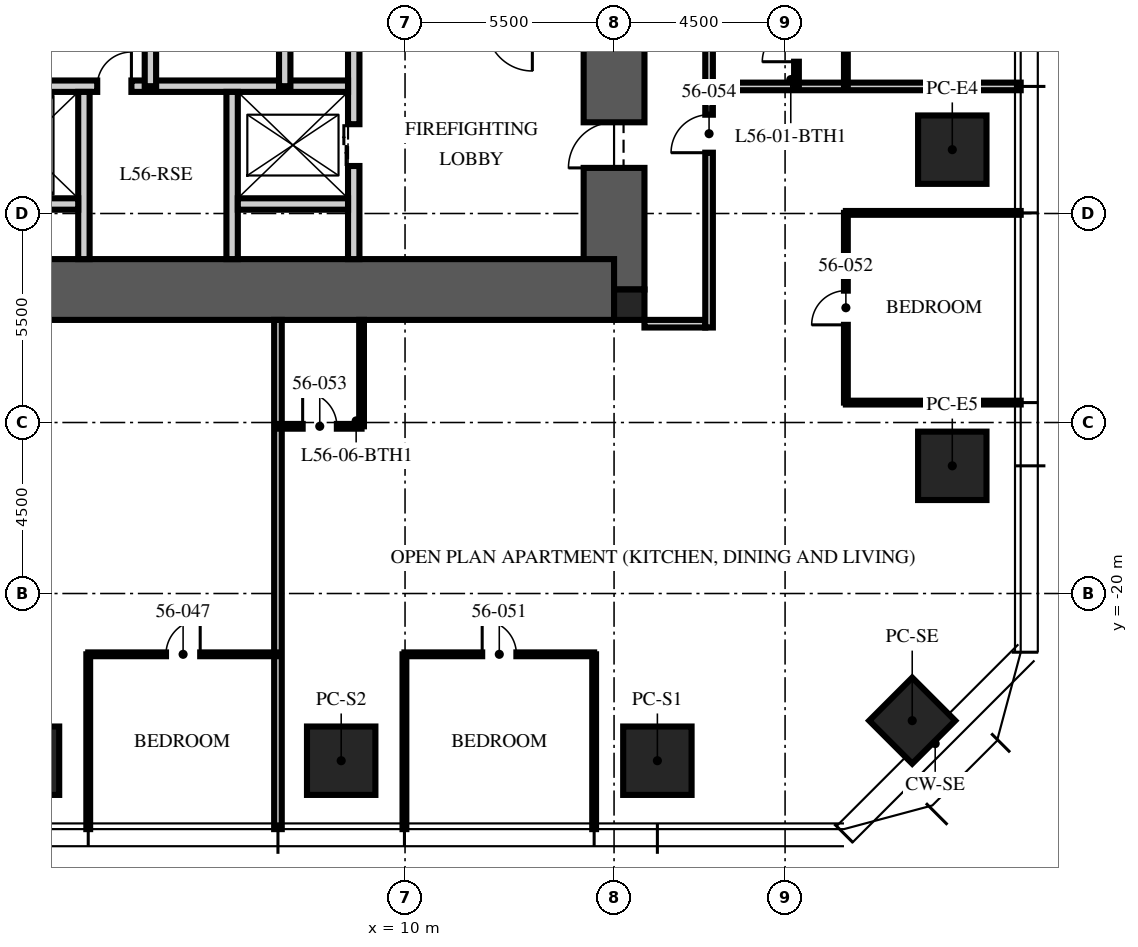
"""IFC4 building model, lengths in metres.
Left out: names, types, materials, properties, quantities, classifications, styles, units other than length and angle.
Written with IfcOpenShell. Run it as: python <this file> out.ifc"""

import sys

from ifc_helpers import new_model, si_unit, direction, frame, frame_2d, origin, origin_2d, place, context, subcontext, project, spatial, rectangle, extrude, element, fill, save


model = new_model("IFC4")
c1 = context("Model", 3, precision=1e-05, world=origin(), true_north=direction((0.0, 1.0)))
c2 = subcontext(c1, "Body", "Model", "MODEL_VIEW")
j1 = project(units=[si_unit("LENGTHUNIT", "METRE"), si_unit("PLANEANGLEUNIT", "RADIAN")], contexts=[c1])
p1 = place(None, origin())
s1 = spatial("IfcSite", under=j1, at=p1, CompositionType="ELEMENT")
p2 = place(p1, origin())
s2 = spatial("IfcBuilding", under=s1, at=p2, CompositionType="ELEMENT")
p3 = place(p2, frame((0.0, 0.0, 225.75)))
s3 = spatial("IfcBuildingStorey", under=s2, at=p3, CompositionType="ELEMENT", Elevation=225.75)
p4 = place(p3, frame((15.5, -12.0, -0.25), z_axis=(0.0, 0.0, 1.0), x_axis=(0.0, 1.0, 0.0)))
e1 = element("IfcWall", 1, at=p4, inside=s3, PredefinedType="SHEAR", context=c2, shape_type="SweptSolid", body=[
    extrude(rectangle(XDim=24.0, YDim=1.6, at=frame_2d((12.0, 0.0))), origin(), (0.0, 0.0, 1.0), 3.75),
])
p5 = place(p4, frame((3.2, 0.0, 0.25)))
e2 = element("IfcOpeningElement", 2, at=p5, cuts=e1, PredefinedType="OPENING", context=c2, shape_type="SweptSolid", body=[
    extrude(rectangle(XDim=1.2, YDim=2.1, at=frame_2d((0.6, 1.05))), frame((0.0, 0.81, 0.0), z_axis=(0.0, -1.0, 0.0), x_axis=(1.0, 0.0, 0.0)), (0.0, 0.0, 1.0), 1.62),
])
p6 = place(p4, frame((19.3, 0.0, 0.25)))
e3 = element("IfcOpeningElement", 3, at=p6, cuts=e1, PredefinedType="OPENING", context=c2, shape_type="SweptSolid", body=[
    extrude(rectangle(XDim=1.8, YDim=2.1, at=frame_2d((0.9, 1.05))), frame((0.0, 0.81, 0.0), z_axis=(0.0, -1.0, 0.0), x_axis=(1.0, 0.0, 0.0)), (0.0, 0.0, 1.0), 1.62),
])
p7 = place(p3, frame((-15.5, -12.0, -0.25), z_axis=(0.0, 0.0, 1.0), x_axis=(1.0, 0.0, 0.0)))
e4 = element("IfcWall", 4, at=p7, inside=s3, PredefinedType="SHEAR", context=c2, shape_type="SweptSolid", body=[
    extrude(rectangle(XDim=31.0, YDim=1.6, at=frame_2d((15.5, 0.0))), origin(), (0.0, 0.0, 1.0), 3.75),
])
p8 = place(p3, frame((15.9, -12.4, -0.25), z_axis=(0.0, 0.0, 1.0), x_axis=(1.0, 0.0, 0.0)))
e5 = element("IfcColumn", 5, at=p8, inside=s3, PredefinedType="COLUMN", context=c2, shape_type="SweptSolid", body=[
    extrude(rectangle(XDim=0.8, YDim=0.8, at=origin_2d()), origin(), (0.0, 0.0, 1.0), 3.75),
])
for number, where, z_axis, x_axis in (
    (6, (24.4, -8.32, 0.0), (0.0, 0.0, 1.0), (0.0, 1.0, 0.0)),
    (7, (24.4, -16.64, 0.0), (0.0, 0.0, 1.0), (0.0, 1.0, 0.0)),
    (8, (16.64, -24.4, 0.0), (0.0, 0.0, 1.0), (1.0, 0.0, 0.0)),
    (9, (8.32, -24.4, 0.0), (0.0, 0.0, 1.0), (1.0, 0.0, 0.0)),
    (10, (0.0, -24.4, 0.0), (0.0, 0.0, 1.0), (1.0, 0.0, 0.0)),
):
    element("IfcColumn", number, at=place(p3, frame(where, z_axis=z_axis, x_axis=x_axis)), inside=s3, PredefinedType="COLUMN", context=c2, shape_type="SweptSolid", body=[
        extrude(rectangle(XDim=1.8, YDim=1.8, at=origin_2d()), origin(), (0.0, 0.0, 1.0), 3.75),
    ])
p9 = place(p3, frame((23.346, -23.346, 0.0), z_axis=(0.0, 0.0, 1.0), x_axis=(0.707106781187, 0.707106781187, 0.0)))
e11 = element("IfcColumn", 11, at=p9, inside=s3, PredefinedType="COLUMN", context=c2, shape_type="SweptSolid", body=[
    extrude(rectangle(XDim=1.6, YDim=1.6, at=origin_2d()), origin(), (0.0, 0.0, 1.0), 3.75),
])
p10 = place(p3, frame((8.65, -11.2, 0.0), z_axis=(0.0, 0.0, 1.0), x_axis=(0.0, 1.0, 0.0)))
e12 = element("IfcWall", 12, at=p10, inside=s3, PredefinedType="PARTITIONING", context=c2, shape_type="SweptSolid", body=[
    extrude(rectangle(XDim=6.3, YDim=0.3, at=frame_2d((3.15, 0.0))), origin(), (0.0, 0.0, 1.0), 3.5),
])
p11 = place(p10, frame((2.45, 0.0, 0.0)))
e13 = element("IfcOpeningElement", 13, at=p11, cuts=e12, PredefinedType="OPENING", context=c2, shape_type="SweptSolid", body=[
    extrude(rectangle(XDim=1.1, YDim=2.1, at=frame_2d((0.55, 1.05))), frame((0.0, 0.16, 0.0), z_axis=(0.0, -1.0, 0.0), x_axis=(1.0, 0.0, 0.0)), (0.0, 0.0, 1.0), 0.32),
])
p12 = place(p3, frame((-8.5, -6.65, 0.0), z_axis=(0.0, 0.0, 1.0), x_axis=(1.0, 0.0, 0.0)))
e14 = element("IfcWall", 14, at=p12, inside=s3, PredefinedType="PARTITIONING", context=c2, shape_type="SweptSolid", body=[
    extrude(rectangle(XDim=17.0, YDim=0.3, at=frame_2d((8.5, 0.0))), origin(), (0.0, 0.0, 1.0), 3.5),
])
p13 = place(p12, frame((7.8, 0.0, 0.0)))
e15 = element("IfcOpeningElement", 15, at=p13, cuts=e14, PredefinedType="OPENING", context=c2, shape_type="SweptSolid", body=[
    extrude(rectangle(XDim=1.3, YDim=2.4, at=frame_2d((0.65, 1.2))), frame((0.0, 0.16, 0.0), z_axis=(0.0, -1.0, 0.0), x_axis=(1.0, 0.0, 0.0)), (0.0, 0.0, 1.0), 0.32),
])
p14 = place(p12, frame((5.65, 0.0, 0.0)))
e16 = element("IfcOpeningElement", 16, at=p14, cuts=e14, PredefinedType="OPENING", context=c2, shape_type="SweptSolid", body=[
    extrude(rectangle(XDim=0.9, YDim=2.1, at=frame_2d((0.45, 1.05))), frame((0.0, 0.16, 0.0), z_axis=(0.0, -1.0, 0.0), x_axis=(1.0, 0.0, 0.0)), (0.0, 0.0, 1.0), 0.32),
])
p15 = place(p12, frame((10.4, 0.0, 0.0)))
e17 = element("IfcOpeningElement", 17, at=p15, cuts=e14, PredefinedType="OPENING", context=c2, shape_type="SweptSolid", body=[
    extrude(rectangle(XDim=0.9, YDim=2.1, at=frame_2d((0.45, 1.05))), frame((0.0, 0.16, 0.0), z_axis=(0.0, -1.0, 0.0), x_axis=(1.0, 0.0, 0.0)), (0.0, 0.0, 1.0), 0.32),
])
for number, where, z_axis, x_axis in (
    (18, (1.55, -11.2, 0.0), (0.0, 0.0, 1.0), (0.0, 1.0, 0.0)),
    (19, (5.45, -11.2, 0.0), (0.0, 0.0, 1.0), (0.0, 1.0, 0.0)),
):
    element("IfcWall", number, at=place(p3, frame(where, z_axis=z_axis, x_axis=x_axis)), inside=s3, PredefinedType="PARTITIONING", context=c2, shape_type="SweptSolid", body=[
        extrude(rectangle(XDim=4.4, YDim=0.3, at=frame_2d((2.2, 0.0))), origin(), (0.0, 0.0, 1.0), 3.5),
    ])
for number, where, z_axis, x_axis in (
    (20, (-1.5, -9.75, 0.0), (0.0, 0.0, 1.0), (1.0, 0.0, 0.0)),
    (21, (5.6, -9.75, 0.0), (0.0, 0.0, 1.0), (1.0, 0.0, 0.0)),
):
    element("IfcWall", number, at=place(p3, frame(where, z_axis=z_axis, x_axis=x_axis)), inside=s3, PredefinedType="PARTITIONING", context=c2, shape_type="SweptSolid", body=[
        extrude(rectangle(XDim=2.9, YDim=0.3, at=frame_2d((1.45, 0.0))), origin(), (0.0, 0.0, 1.0), 3.5),
    ])
p16 = place(p3, frame((3.3, -6.65, 0.0), z_axis=(0.0, 0.0, 1.0), x_axis=(0.0, 1.0, 0.0)))
e22 = element("IfcWall", 22, at=p16, inside=s3, PredefinedType="PARTITIONING", context=c2, shape_type="SweptSolid", body=[
    extrude(rectangle(XDim=8.65, YDim=0.3, at=frame_2d((4.325, 0.0))), origin(), (0.0, 0.0, 1.0), 3.5),
])
p17 = place(p16, frame((3.875, 0.0, 0.0)))
e23 = element("IfcOpeningElement", 23, at=p17, cuts=e22, PredefinedType="OPENING", context=c2, shape_type="SweptSolid", body=[
    extrude(rectangle(XDim=0.9, YDim=2.1, at=frame_2d((0.45, 1.05))), frame((0.0, 0.16, 0.0), z_axis=(0.0, -1.0, 0.0), x_axis=(1.0, 0.0, 0.0)), (0.0, 0.0, 1.0), 0.32),
])
p18 = place(p3, frame((6.834, -6.65, 0.0), z_axis=(0.0, 0.0, 1.0), x_axis=(0.0, 1.0, 0.0)))
e24 = element("IfcWall", 24, at=p18, inside=s3, PredefinedType="PARTITIONING", context=c2, shape_type="SweptSolid", body=[
    extrude(rectangle(XDim=8.65, YDim=0.3, at=frame_2d((4.325, 0.0))), origin(), (0.0, 0.0, 1.0), 3.5),
])
p19 = place(p3, frame((16.3, -12.9, 0.0), z_axis=(0.0, 0.0, 1.0), x_axis=(1.0, 0.0, 0.0)))
e25 = element("IfcWall", 25, at=p19, inside=s3, PredefinedType="PARTITIONING", context=c2, shape_type="SweptSolid", body=[
    extrude(rectangle(XDim=1.6, YDim=0.2, at=frame_2d((0.8, 0.0))), origin(), (0.0, 0.0, 1.0), 2.3),
])
p20 = place(p3, frame((18.1, -6.656, 0.0), z_axis=(0.0, 0.0, 1.0), x_axis=(1.0, 0.0, 0.0)))
e26 = element("IfcWall", 26, at=p20, inside=s3, PredefinedType="PARTITIONING", context=c2, shape_type="SweptSolid", body=[
    extrude(rectangle(XDim=8.1, YDim=0.2, at=frame_2d((4.05, 0.0))), origin(), (0.0, 0.0, 1.0), 2.91),
])
p21 = place(p3, frame((1.664, -21.6, 0.0), z_axis=(0.0, 0.0, 1.0), x_axis=(0.0, -1.0, 0.0)))
e27 = element("IfcWall", 27, at=p21, inside=s3, PredefinedType="PARTITIONING", context=c2, shape_type="SweptSolid", body=[
    extrude(rectangle(XDim=4.6, YDim=0.1, at=frame_2d((2.3, 0.0))), origin(), (0.0, 0.0, 1.0), 2.91),
])
p22 = place(p3, frame((6.656, -12.8, 0.0), z_axis=(0.0, 0.0, 1.0), x_axis=(0.0, -1.0, 0.0)))
e28 = element("IfcWall", 28, at=p22, inside=s3, PredefinedType="PARTITIONING", context=c2, shape_type="SweptSolid", body=[
    extrude(rectangle(XDim=13.4, YDim=0.2, at=frame_2d((6.7, 0.0))), origin(), (0.0, 0.0, 1.0), 2.91),
])
for number, where, z_axis, x_axis in (
    (29, (9.984, -21.6, 0.0), (0.0, 0.0, 1.0), (0.0, -1.0, 0.0)),
    (30, (14.976, -21.6, 0.0), (0.0, 0.0, 1.0), (0.0, -1.0, 0.0)),
    (31, (21.6, -14.976, 0.0), (0.0, 0.0, 1.0), (1.0, 0.0, 0.0)),
    (32, (21.6, -9.984, 0.0), (0.0, 0.0, 1.0), (1.0, 0.0, 0.0)),
):
    element("IfcWall", number, at=place(p3, frame(where, z_axis=z_axis, x_axis=x_axis)), inside=s3, PredefinedType="PARTITIONING", context=c2, shape_type="SweptSolid", body=[
        extrude(rectangle(XDim=4.6, YDim=0.1, at=frame_2d((2.3, 0.0))), origin(), (0.0, 0.0, 1.0), 2.91),
    ])
p23 = place(p3, frame((21.6, -6.656, 0.0), z_axis=(0.0, 0.0, 1.0), x_axis=(0.0, 1.0, 0.0)))
e33 = element("IfcWall", 33, at=p23, inside=s3, PredefinedType="PARTITIONING", context=c2, shape_type="SweptSolid", body=[
    extrude(rectangle(XDim=4.992, YDim=0.1, at=frame_2d((2.496, 0.0))), origin(), (0.0, 0.0, 1.0), 2.81),
])
p24 = place(p23, frame((2.046, 0.0, 0.0)))
e34 = element("IfcOpeningElement", 34, at=p24, cuts=e33, PredefinedType="OPENING", context=c2, shape_type="SweptSolid", body=[
    extrude(rectangle(XDim=0.9, YDim=2.1, at=frame_2d((0.45, 1.05))), frame((0.0, 0.06, 0.0), z_axis=(0.0, -1.0, 0.0), x_axis=(1.0, 0.0, 0.0)), (0.0, 0.0, 1.0), 0.12),
])
p25 = place(p3, frame((20.3, -6.656, 0.0), z_axis=(0.0, 0.0, 1.0), x_axis=(0.0, 1.0, 0.0)))
e35 = element("IfcWall", 35, at=p25, inside=s3, PredefinedType="PARTITIONING", context=c2, shape_type="SweptSolid", body=[
    extrude(rectangle(XDim=2.2, YDim=0.125, at=frame_2d((1.1, 0.0))), origin(), (0.0, 0.0, 1.0), 3.5),
])
p26 = place(p25, frame((0.65, 0.0, 0.0)))
e36 = element("IfcOpeningElement", 36, at=p26, cuts=e35, PredefinedType="OPENING", context=c2, shape_type="SweptSolid", body=[
    extrude(rectangle(XDim=0.9, YDim=2.1, at=frame_2d((0.45, 1.05))), frame((0.0, 0.073, 0.0), z_axis=(0.0, -1.0, 0.0), x_axis=(1.0, 0.0, 0.0)), (0.0, 0.0, 1.0), 0.145),
])
p27 = place(p3, frame((1.664, -21.6, 0.0), z_axis=(0.0, 0.0, 1.0), x_axis=(1.0, 0.0, 0.0)))
e37 = element("IfcWall", 37, at=p27, inside=s3, PredefinedType="PARTITIONING", context=c2, shape_type="SweptSolid", body=[
    extrude(rectangle(XDim=4.992, YDim=0.1, at=frame_2d((2.496, 0.0))), origin(), (0.0, 0.0, 1.0), 2.81),
])
p28 = place(p27, frame((2.046, 0.0, 0.0)))
e38 = element("IfcOpeningElement", 38, at=p28, cuts=e37, PredefinedType="OPENING", context=c2, shape_type="SweptSolid", body=[
    extrude(rectangle(XDim=0.9, YDim=2.1, at=frame_2d((0.45, 1.05))), frame((0.0, 0.06, 0.0), z_axis=(0.0, -1.0, 0.0), x_axis=(1.0, 0.0, 0.0)), (0.0, 0.0, 1.0), 0.12),
])
p29 = place(p3, frame((9.984, -21.6, 0.0), z_axis=(0.0, 0.0, 1.0), x_axis=(1.0, 0.0, 0.0)))
e39 = element("IfcWall", 39, at=p29, inside=s3, PredefinedType="PARTITIONING", context=c2, shape_type="SweptSolid", body=[
    extrude(rectangle(XDim=4.992, YDim=0.1, at=frame_2d((2.496, 0.0))), origin(), (0.0, 0.0, 1.0), 2.81),
])
p30 = place(p29, frame((2.046, 0.0, 0.0)))
e40 = element("IfcOpeningElement", 40, at=p30, cuts=e39, PredefinedType="OPENING", context=c2, shape_type="SweptSolid", body=[
    extrude(rectangle(XDim=0.9, YDim=2.1, at=frame_2d((0.45, 1.05))), frame((0.0, 0.06, 0.0), z_axis=(0.0, -1.0, 0.0), x_axis=(1.0, 0.0, 0.0)), (0.0, 0.0, 1.0), 0.12),
])
p31 = place(p3, frame((21.6, -14.976, 0.0), z_axis=(0.0, 0.0, 1.0), x_axis=(0.0, 1.0, 0.0)))
e41 = element("IfcWall", 41, at=p31, inside=s3, PredefinedType="PARTITIONING", context=c2, shape_type="SweptSolid", body=[
    extrude(rectangle(XDim=4.992, YDim=0.1, at=frame_2d((2.496, 0.0))), origin(), (0.0, 0.0, 1.0), 2.81),
])
p32 = place(p31, frame((2.046, 0.0, 0.0)))
e42 = element("IfcOpeningElement", 42, at=p32, cuts=e41, PredefinedType="OPENING", context=c2, shape_type="SweptSolid", body=[
    extrude(rectangle(XDim=0.9, YDim=2.1, at=frame_2d((0.45, 1.05))), frame((0.0, 0.06, 0.0), z_axis=(0.0, -1.0, 0.0), x_axis=(1.0, 0.0, 0.0)), (0.0, 0.0, 1.0), 0.12),
])
p33 = place(p3, frame((6.656, -15.6, 0.0), z_axis=(0.0, 0.0, 1.0), x_axis=(1.0, 0.0, 0.0)))
e43 = element("IfcWall", 43, at=p33, inside=s3, PredefinedType="PARTITIONING", context=c2, shape_type="SweptSolid", body=[
    extrude(rectangle(XDim=2.2, YDim=0.125, at=frame_2d((1.1, 0.0))), origin(), (0.0, 0.0, 1.0), 2.6),
])
p34 = place(p33, frame((0.65, 0.0, 0.0)))
e44 = element("IfcOpeningElement", 44, at=p34, cuts=e43, PredefinedType="OPENING", context=c2, shape_type="SweptSolid", body=[
    extrude(rectangle(XDim=0.9, YDim=2.1, at=frame_2d((0.45, 1.05))), frame((0.0, 0.073, 0.0), z_axis=(0.0, -1.0, 0.0), x_axis=(1.0, 0.0, 0.0)), (0.0, 0.0, 1.0), 0.145),
])
p35 = place(p3, frame((8.856, -12.8, 0.0), z_axis=(0.0, 0.0, 1.0), x_axis=(0.0, -1.0, 0.0)))
e45 = element("IfcWall", 45, at=p35, inside=s3, PredefinedType="PARTITIONING", context=c2, shape_type="SweptSolid", body=[
    extrude(rectangle(XDim=2.8, YDim=0.125, at=frame_2d((1.4, 0.0))), origin(), (0.0, 0.0, 1.0), 3.5),
])
p36 = place(p3, frame((18.0, -13.0, 0.0), z_axis=(0.0, 0.0, 1.0), x_axis=(0.0, 1.0, 0.0)))
e46 = element("IfcWall", 46, at=p36, inside=s3, PredefinedType="PARTITIONING", context=c2, shape_type="SweptSolid", body=[
    extrude(rectangle(XDim=25.8, YDim=0.2, at=frame_2d((12.9, 0.0))), origin(), (0.0, 0.0, 1.0), 2.6),
])
p37 = place(p36, frame((13.114, 0.0, 0.0)))
e47 = element("IfcOpeningElement", 47, at=p37, cuts=e46, PredefinedType="OPENING", context=c2, shape_type="SweptSolid", body=[
    extrude(rectangle(XDim=1.0, YDim=2.2, at=frame_2d((0.5, 1.1))), frame((0.0, 0.11, 0.0), z_axis=(0.0, -1.0, 0.0), x_axis=(1.0, 0.0, 0.0)), (0.0, 0.0, 1.0), 0.22),
])
p38 = place(p36, frame((23.684, 0.0, 0.0)))
e48 = element("IfcOpeningElement", 48, at=p38, cuts=e46, PredefinedType="OPENING", context=c2, shape_type="SweptSolid", body=[
    extrude(rectangle(XDim=1.0, YDim=2.2, at=frame_2d((0.5, 1.1))), frame((0.0, 0.11, 0.0), z_axis=(0.0, -1.0, 0.0), x_axis=(1.0, 0.0, 0.0)), (0.0, 0.0, 1.0), 0.22),
])
p39 = place(p36, frame((4.6, 0.0, 0.0)))
e49 = element("IfcOpeningElement", 49, at=p39, cuts=e46, PredefinedType="OPENING", context=c2, shape_type="SweptSolid", body=[
    extrude(rectangle(XDim=1.0, YDim=2.2, at=frame_2d((0.5, 1.1))), frame((0.0, 0.11, 0.0), z_axis=(0.0, -1.0, 0.0), x_axis=(1.0, 0.0, 0.0)), (0.0, 0.0, 1.0), 0.22),
])
p40 = place(p5, origin())
e50 = element("IfcDoor", 50, at=p40, inside=s3, OperationType="SINGLE_SWING_LEFT", PredefinedType="DOOR", context=c2, shape_type="SweptSolid", body=[
    extrude(rectangle(XDim=1.2, YDim=2.1, at=frame_2d((0.6, 1.05))), frame((0.0, 0.025, 0.0), z_axis=(0.0, -1.0, 0.0), x_axis=(1.0, 0.0, 0.0)), (0.0, 0.0, 1.0), 0.05),
])
fill(e2, e50)
p41 = place(p11, origin())
e51 = element("IfcDoor", 51, at=p41, inside=s3, OperationType="DOUBLE_DOOR_SLIDING", PredefinedType="DOOR", context=c2, shape_type="SweptSolid", body=[
    extrude(rectangle(XDim=1.1, YDim=2.1, at=frame_2d((0.55, 1.05))), frame((0.0, 0.025, 0.0), z_axis=(0.0, -1.0, 0.0), x_axis=(1.0, 0.0, 0.0)), (0.0, 0.0, 1.0), 0.05),
])
fill(e13, e51)
p42 = place(p15, origin())
e52 = element("IfcDoor", 52, at=p42, inside=s3, OperationType="SINGLE_SWING_RIGHT", PredefinedType="DOOR", context=c2, shape_type="SweptSolid", body=[
    extrude(rectangle(XDim=0.9, YDim=2.1, at=frame_2d((0.45, 1.05))), frame((0.0, 0.025, 0.0), z_axis=(0.0, -1.0, 0.0), x_axis=(1.0, 0.0, 0.0)), (0.0, 0.0, 1.0), 0.05),
])
fill(e17, e52)
p43 = place(p26, origin())
e53 = element("IfcDoor", 53, at=p43, inside=s3, OperationType="SINGLE_SWING_LEFT", PredefinedType="DOOR", context=c2, shape_type="SweptSolid", body=[
    extrude(rectangle(XDim=0.9, YDim=2.1, at=frame_2d((0.45, 1.05))), frame((0.0, 0.025, 0.0), z_axis=(0.0, -1.0, 0.0), x_axis=(1.0, 0.0, 0.0)), (0.0, 0.0, 1.0), 0.05),
])
fill(e36, e53)
p44 = place(p28, origin())
e54 = element("IfcDoor", 54, at=p44, inside=s3, OperationType="SINGLE_SWING_RIGHT", PredefinedType="DOOR", context=c2, shape_type="SweptSolid", body=[
    extrude(rectangle(XDim=0.9, YDim=2.1, at=frame_2d((0.45, 1.05))), frame((0.0, 0.025, 0.0), z_axis=(0.0, -1.0, 0.0), x_axis=(1.0, 0.0, 0.0)), (0.0, 0.0, 1.0), 0.05),
])
fill(e38, e54)
p45 = place(p30, origin())
e55 = element("IfcDoor", 55, at=p45, inside=s3, OperationType="SINGLE_SWING_LEFT", PredefinedType="DOOR", context=c2, shape_type="SweptSolid", body=[
    extrude(rectangle(XDim=0.9, YDim=2.1, at=frame_2d((0.45, 1.05))), frame((0.0, 0.025, 0.0), z_axis=(0.0, -1.0, 0.0), x_axis=(1.0, 0.0, 0.0)), (0.0, 0.0, 1.0), 0.05),
])
fill(e40, e55)
p46 = place(p32, origin())
e56 = element("IfcDoor", 56, at=p46, inside=s3, OperationType="SINGLE_SWING_LEFT", PredefinedType="DOOR", context=c2, shape_type="SweptSolid", body=[
    extrude(rectangle(XDim=0.9, YDim=2.1, at=frame_2d((0.45, 1.05))), frame((0.0, 0.025, 0.0), z_axis=(0.0, -1.0, 0.0), x_axis=(1.0, 0.0, 0.0)), (0.0, 0.0, 1.0), 0.05),
])
fill(e42, e56)
p47 = place(p34, origin())
e57 = element("IfcDoor", 57, at=p47, inside=s3, OperationType="SINGLE_SWING_LEFT", PredefinedType="DOOR", context=c2, shape_type="SweptSolid", body=[
    extrude(rectangle(XDim=0.9, YDim=2.1, at=frame_2d((0.45, 1.05))), frame((0.0, 0.025, 0.0), z_axis=(0.0, -1.0, 0.0), x_axis=(1.0, 0.0, 0.0)), (0.0, 0.0, 1.0), 0.05),
])
fill(e44, e57)
p48 = place(p39, origin())
e58 = element("IfcDoor", 58, at=p48, inside=s3, OperationType="SINGLE_SWING_LEFT", PredefinedType="DOOR", context=c2, shape_type="SweptSolid", body=[
    extrude(rectangle(XDim=1.0, YDim=2.2, at=frame_2d((0.5, 1.1))), frame((0.0, 0.025, 0.0), z_axis=(0.0, -1.0, 0.0), x_axis=(1.0, 0.0, 0.0)), (0.0, 0.0, 1.0), 0.05),
])
fill(e49, e58)
save(model, sys.argv[1])
